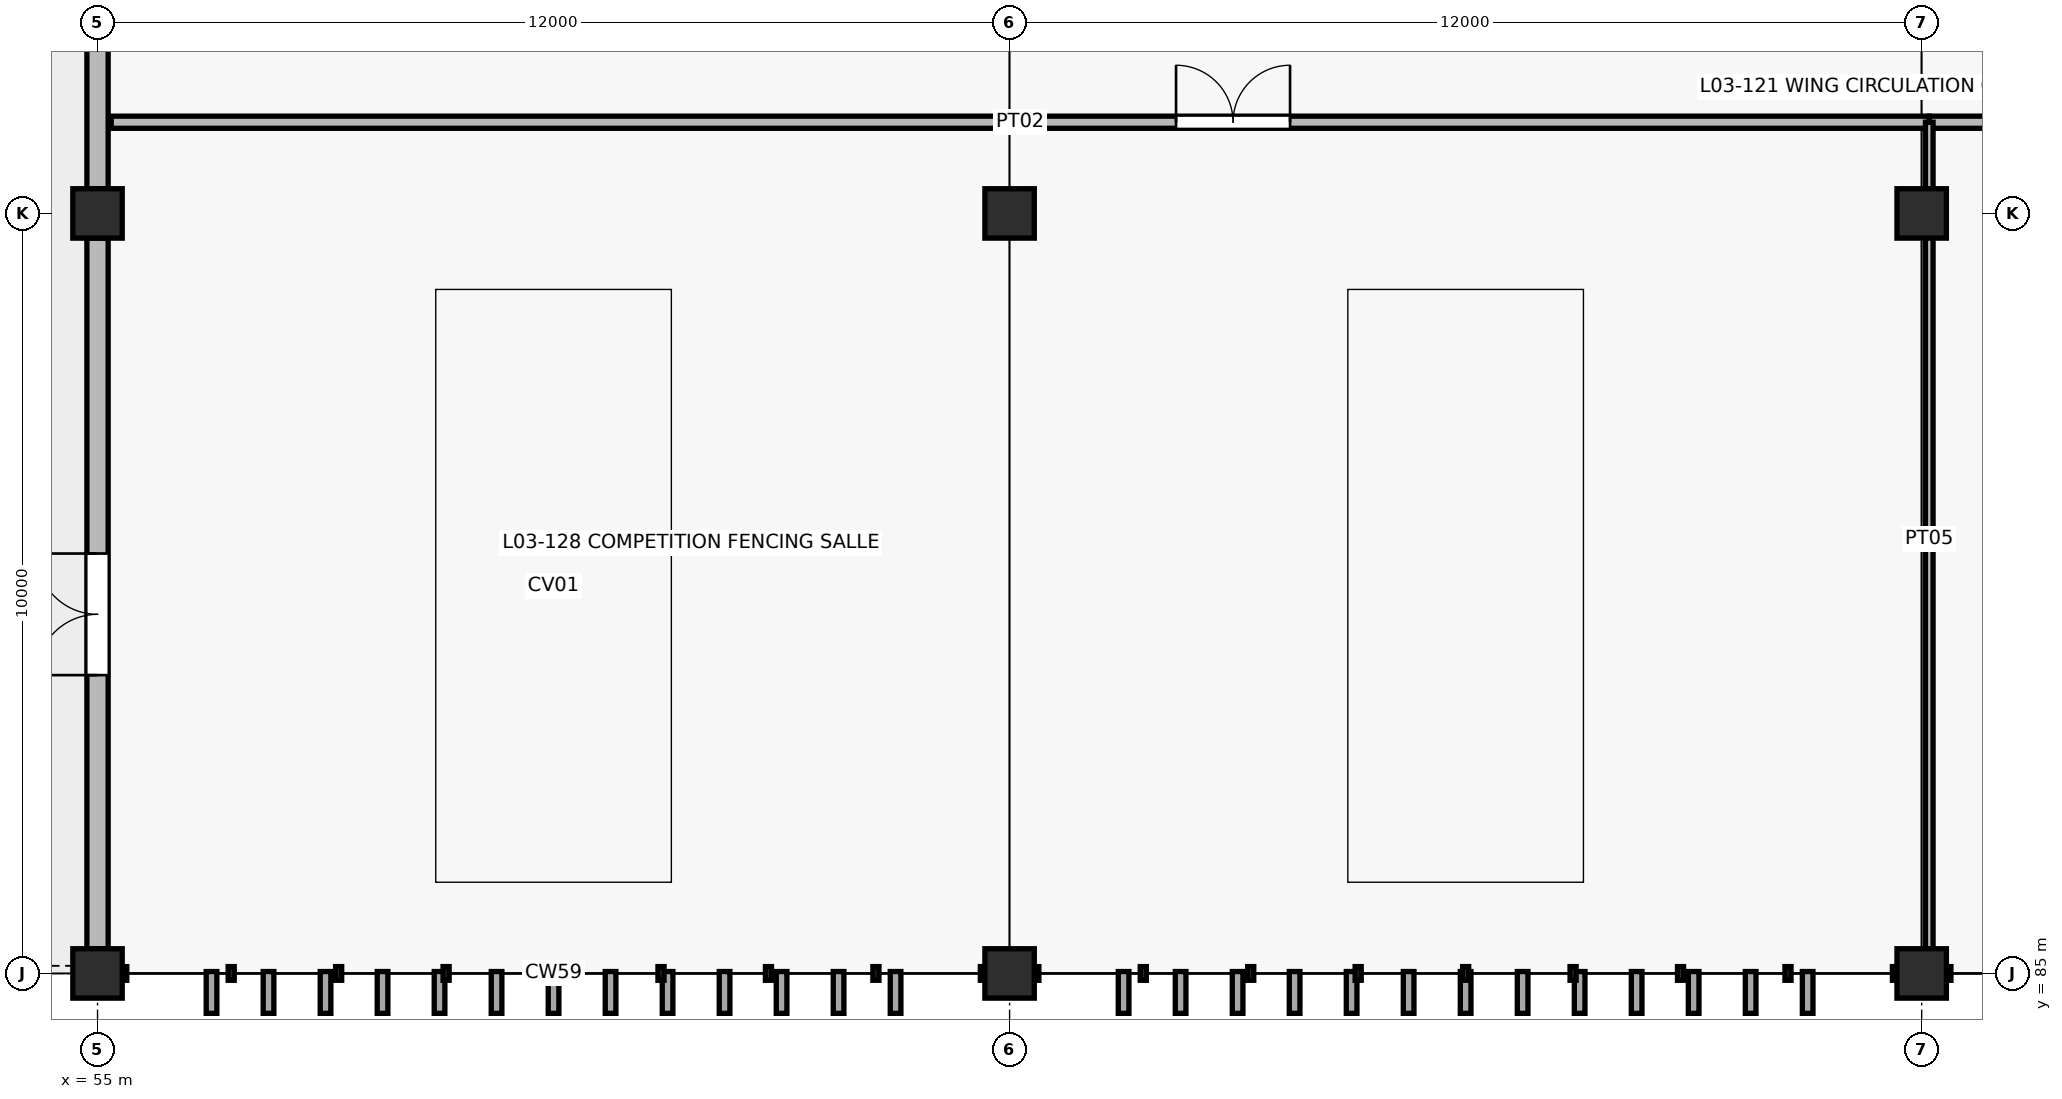
"""IFC4 building model, lengths in metres.
Left out: names, types, materials, properties, quantities, classifications, styles, units other than length and angle.
Written with IfcOpenShell. Run it as: python <this file> out.ifc"""

import sys

from ifc_helpers import new_model, si_unit, direction, frame, frame_2d, origin, origin_2d, place, context, subcontext, project, spatial, rectangle, extrude, element, fill, save


model = new_model("IFC4")
c1 = context("Model", 3, precision=1e-05, world=origin(), true_north=direction((0.0, 1.0)))
c2 = subcontext(c1, "Body", "Model", "MODEL_VIEW")
j1 = project(units=[si_unit("LENGTHUNIT", "METRE"), si_unit("PLANEANGLEUNIT", "RADIAN")], contexts=[c1])
p1 = place(None, origin())
s1 = spatial("IfcSite", under=j1, at=p1, CompositionType="ELEMENT")
p2 = place(p1, origin())
s2 = spatial("IfcBuilding", under=s1, at=p2, CompositionType="ELEMENT")
p3 = place(p2, frame((0.0, 0.0, 13.2)))
s3 = spatial("IfcBuildingStorey", under=s2, at=p3, CompositionType="ELEMENT", Elevation=13.2)
for number, where, z_axis, x_axis in (
    (1, (55.0, 85.0, 0.0), (0.0, 0.0, 1.0), (1.0, 0.0, 0.0)),
    (2, (55.0, 95.0, 0.0), (0.0, 0.0, 1.0), (1.0, 0.0, 0.0)),
    (3, (67.0, 85.0, 0.0), (0.0, 0.0, 1.0), (1.0, 0.0, 0.0)),
    (4, (67.0, 95.0, 0.0), (0.0, 0.0, 1.0), (1.0, 0.0, 0.0)),
    (5, (79.0, 85.0, 0.0), (0.0, 0.0, 1.0), (1.0, 0.0, 0.0)),
    (6, (79.0, 95.0, 0.0), (0.0, 0.0, 1.0), (1.0, 0.0, 0.0)),
):
    element("IfcColumn", number, at=place(p3, frame(where, z_axis=z_axis, x_axis=x_axis)), inside=s3, PredefinedType="COLUMN", context=c2, shape_type="SweptSolid", body=[
        extrude(rectangle(XDim=0.65, YDim=0.65, at=origin_2d()), origin(), (0.0, 0.0, 1.0), 4.2),
    ])
p4 = place(p3, frame((55.0, 85.325, 0.0), z_axis=(0.0, 0.0, 1.0), x_axis=(0.0, 1.0, 0.0)))
e7 = element("IfcWall", 7, at=p4, inside=s3, PredefinedType="SOLIDWALL", context=c2, shape_type="SweptSolid", body=[
    extrude(rectangle(XDim=9.35, YDim=0.28, at=frame_2d((4.675, 0.0))), origin(), (0.0, 0.0, 1.0), 3.005),
])
p5 = place(p4, frame((3.6, 0.0, 0.0)))
e8 = element("IfcOpeningElement", 8, at=p5, cuts=e7, PredefinedType="OPENING", context=c2, shape_type="SweptSolid", body=[
    extrude(rectangle(XDim=1.6, YDim=2.2, at=frame_2d((0.8, 1.1))), frame((0.0, 0.15, 0.0), z_axis=(0.0, -1.0, 0.0), x_axis=(1.0, 0.0, 0.0)), (0.0, 0.0, 1.0), 0.3),
])
p6 = place(p3, frame((55.0, 95.325, 0.0), z_axis=(0.0, 0.0, 1.0), x_axis=(0.0, 1.0, 0.0)))
e9 = element("IfcWall", 9, at=p6, inside=s3, PredefinedType="SOLIDWALL", context=c2, shape_type="SweptSolid", body=[
    extrude(rectangle(XDim=9.35, YDim=0.28, at=frame_2d((4.675, 0.0))), origin(), (0.0, 0.0, 1.0), 3.005),
])
p7 = place(p6, frame((2.8, 0.0, 0.9)))
e10 = element("IfcOpeningElement", 10, at=p7, cuts=e9, PredefinedType="OPENING", context=c2, shape_type="SweptSolid", body=[
    extrude(rectangle(XDim=1.5, YDim=1.8, at=frame_2d((0.75, 0.9))), frame((0.0, 0.15, 0.0), z_axis=(0.0, -1.0, 0.0), x_axis=(1.0, 0.0, 0.0)), (0.0, 0.0, 1.0), 0.3),
])
p8 = place(p3, frame((55.18, 96.2, 0.0), z_axis=(0.0, 0.0, 1.0), x_axis=(1.0, 0.0, 0.0)))
e11 = element("IfcWall", 11, at=p8, inside=s3, PredefinedType="PARTITIONING", context=c2, shape_type="SweptSolid", body=[
    extrude(rectangle(XDim=23.92, YDim=0.16, at=frame_2d((11.96, 0.0))), origin(), (0.0, 0.0, 1.0), 3.005),
])
p9 = place(p8, frame((14.01, 0.0, 0.0)))
e12 = element("IfcOpeningElement", 12, at=p9, cuts=e11, PredefinedType="OPENING", context=c2, shape_type="SweptSolid", body=[
    extrude(rectangle(XDim=1.5, YDim=2.2, at=frame_2d((0.75, 1.1))), frame((0.0, 0.09, 0.0), z_axis=(0.0, -1.0, 0.0), x_axis=(1.0, 0.0, 0.0)), (0.0, 0.0, 1.0), 0.18),
])
p10 = place(p3, frame((79.1, 96.2, 0.0), z_axis=(0.0, 0.0, 1.0), x_axis=(1.0, 0.0, 0.0)))
e13 = element("IfcWall", 13, at=p10, inside=s3, PredefinedType="PARTITIONING", context=c2, shape_type="SweptSolid", body=[
    extrude(rectangle(XDim=22.0, YDim=0.16, at=frame_2d((11.0, 0.0))), origin(), (0.0, 0.0, 1.0), 3.005),
])
p11 = place(p10, frame((7.95, 0.0, 0.0)))
e14 = element("IfcOpeningElement", 14, at=p11, cuts=e13, PredefinedType="OPENING", context=c2, shape_type="SweptSolid", body=[
    extrude(rectangle(XDim=1.7, YDim=2.25, at=frame_2d((0.85, 1.125))), frame((0.0, 0.09, 0.0), z_axis=(0.0, -1.0, 0.0), x_axis=(1.0, 0.0, 0.0)), (0.0, 0.0, 1.0), 0.18),
])
p12 = place(p3, frame((79.1, 85.22, 0.0), z_axis=(0.0, 0.0, 1.0), x_axis=(0.0, 1.0, 0.0)))
e15 = element("IfcWall", 15, at=p12, inside=s3, PredefinedType="PARTITIONING", context=c2, shape_type="SweptSolid", body=[
    extrude(rectangle(XDim=10.98, YDim=0.1, at=frame_2d((5.49, 0.0))), origin(), (0.0, 0.0, 1.0), 3.005),
])
p13 = place(p5, origin())
e16 = element("IfcDoor", 16, at=p13, inside=s3, OperationType="DOUBLE_DOOR_SINGLE_SWING", PredefinedType="DOOR", context=c2, shape_type="SweptSolid", body=[
    extrude(rectangle(XDim=1.6, YDim=2.2, at=frame_2d((0.8, 1.1))), frame((0.0, 0.025, 0.0), z_axis=(0.0, -1.0, 0.0), x_axis=(1.0, 0.0, 0.0)), (0.0, 0.0, 1.0), 0.05),
])
fill(e8, e16)
p14 = place(p9, origin())
e17 = element("IfcDoor", 17, at=p14, inside=s3, OperationType="DOUBLE_DOOR_SINGLE_SWING", PredefinedType="DOOR", context=c2, shape_type="SweptSolid", body=[
    extrude(rectangle(XDim=1.5, YDim=2.2, at=frame_2d((0.75, 1.1))), frame((0.0, 0.025, 0.0), z_axis=(0.0, -1.0, 0.0), x_axis=(1.0, 0.0, 0.0)), (0.0, 0.0, 1.0), 0.05),
])
fill(e12, e17)
save(model, sys.argv[1])
